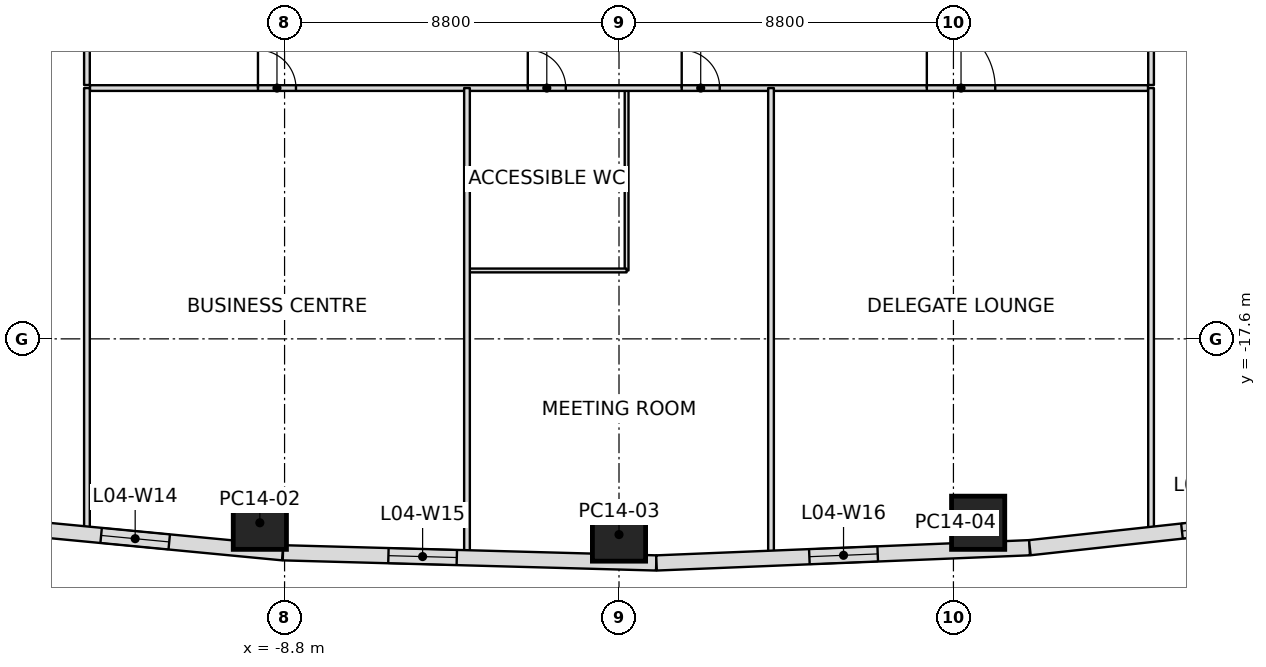
"""IFC4 building model, lengths in metres.
Left out: names, types, materials, properties, quantities, classifications, styles, units other than length and angle.
Written with IfcOpenShell. Run it as: python <this file> out.ifc"""

import sys

from ifc_helpers import new_model, si_unit, direction, frame, frame_2d, origin, origin_2d, place, context, subcontext, project, spatial, rectangle, extrude, element, fill, save


model = new_model("IFC4")
c1 = context("Model", 3, precision=1e-05, world=origin(), true_north=direction((0.0, 1.0)))
c2 = subcontext(c1, "Body", "Model", "MODEL_VIEW")
j1 = project(units=[si_unit("LENGTHUNIT", "METRE"), si_unit("PLANEANGLEUNIT", "RADIAN")], contexts=[c1])
p1 = place(None, origin())
s1 = spatial("IfcSite", under=j1, at=p1, CompositionType="ELEMENT")
p2 = place(p1, origin())
s2 = spatial("IfcBuilding", under=s1, at=p2, CompositionType="ELEMENT")
p3 = place(p2, frame((0.0, 0.0, 28.8)))
s3 = spatial("IfcBuildingStorey", under=s2, at=p3, CompositionType="ELEMENT", Elevation=28.8)
for number, where, z_axis, x_axis in (
    (1, (-9.45, -22.439, 0.0), (0.0, 0.0, 1.0), (-0.998, 0.066, 0.0)),
    (2, (0.0, -22.75, 0.0), (0.0, 0.0, 1.0), (1.0, 0.0, 0.0)),
    (3, (9.45, -22.439, 0.0), (0.0, 0.0, 1.0), (0.998, 0.066, 0.0)),
):
    element("IfcColumn", number, at=place(p3, frame(where, z_axis=z_axis, x_axis=x_axis)), inside=s3, PredefinedType="COLUMN", context=c2, shape_type="SweptSolid", body=[
        extrude(rectangle(XDim=1.4, YDim=1.4, at=origin_2d()), origin(), (0.0, 0.0, 1.0), 5.4),
    ])
p4 = place(p3, frame((-8.849, -23.229, 0.0), z_axis=(0.0, 0.0, 1.0), x_axis=(-0.995471095278, 0.095064706733, 0.0)))
e4 = element("IfcWall", 4, at=p4, inside=s3, PredefinedType="STANDARD", context=c2, shape_type="SweptSolid", body=[
    extrude(rectangle(XDim=9.826, YDim=0.4, at=frame_2d((4.913, 0.0))), origin(), (0.0, 0.0, 1.0), 4.5),
])
p5 = place(p4, frame((3.0, 0.0, 0.9)))
e5 = element("IfcOpeningElement", 5, at=p5, cuts=e4, PredefinedType="OPENING", context=c2, shape_type="SweptSolid", body=[
    extrude(rectangle(XDim=1.8, YDim=1.5, at=frame_2d((0.9, 0.75))), frame((0.0, 0.2, 0.0), z_axis=(0.0, -1.0, 0.0), x_axis=(1.0, 0.0, 0.0)), (0.0, 0.0, 1.0), 0.4),
])
p6 = place(p3, frame((0.98, -23.497, 0.0), z_axis=(0.0, 0.0, 1.0), x_axis=(-0.999629782494, 0.027208416899, 0.0)))
e6 = element("IfcWall", 6, at=p6, inside=s3, PredefinedType="STANDARD", context=c2, shape_type="SweptSolid", body=[
    extrude(rectangle(XDim=9.825, YDim=0.4, at=frame_2d((4.913, 0.0))), origin(), (0.0, 0.0, 1.0), 4.5),
])
p7 = place(p6, frame((5.25, 0.0, 0.9)))
e7 = element("IfcOpeningElement", 7, at=p7, cuts=e6, PredefinedType="OPENING", context=c2, shape_type="SweptSolid", body=[
    extrude(rectangle(XDim=1.8, YDim=1.5, at=frame_2d((0.9, 0.75))), frame((0.0, 0.2, 0.0), z_axis=(0.0, -1.0, 0.0), x_axis=(1.0, 0.0, 0.0)), (0.0, 0.0, 1.0), 0.4),
])
p8 = place(p3, frame((10.804, -23.096, 0.0), z_axis=(0.0, 0.0, 1.0), x_axis=(-0.999167350404, -0.04079958195, 0.0)))
e8 = element("IfcWall", 8, at=p8, inside=s3, PredefinedType="STANDARD", context=c2, shape_type="SweptSolid", body=[
    extrude(rectangle(XDim=9.826, YDim=0.4, at=frame_2d((4.913, 0.0))), origin(), (0.0, 0.0, 1.0), 4.5),
])
p9 = place(p8, frame((4.0, 0.0, 0.9)))
e9 = element("IfcOpeningElement", 9, at=p9, cuts=e8, PredefinedType="OPENING", context=c2, shape_type="SweptSolid", body=[
    extrude(rectangle(XDim=1.8, YDim=1.5, at=frame_2d((0.9, 0.75))), frame((0.0, 0.2, 0.0), z_axis=(0.0, -1.0, 0.0), x_axis=(1.0, 0.0, 0.0)), (0.0, 0.0, 1.0), 0.4),
])
p10 = place(p3, frame((20.579, -22.028, 0.0), z_axis=(0.0, 0.0, 1.0), x_axis=(-0.994084776508, -0.108606892574, 0.0)))
e10 = element("IfcWall", 10, at=p10, inside=s3, PredefinedType="STANDARD", context=c2, shape_type="SweptSolid", body=[
    extrude(rectangle(XDim=9.826, YDim=0.4, at=frame_2d((4.913, 0.0))), origin(), (0.0, 0.0, 1.0), 4.5),
])
p11 = place(p10, frame((4.0, 0.0, 0.9)))
e11 = element("IfcOpeningElement", 11, at=p11, cuts=e10, PredefinedType="OPENING", context=c2, shape_type="SweptSolid", body=[
    extrude(rectangle(XDim=1.8, YDim=1.5, at=frame_2d((0.9, 0.75))), frame((0.0, 0.2, 0.0), z_axis=(0.0, -1.0, 0.0), x_axis=(1.0, 0.0, 0.0)), (0.0, 0.0, 1.0), 0.4),
])
p12 = place(p3, frame((-14.0, -11.0, 0.0), z_axis=(0.0, 0.0, 1.0), x_axis=(0.0, -1.0, 0.0)))
e12 = element("IfcWall", 12, at=p12, inside=s3, PredefinedType="PARTITIONING", context=c2, shape_type="SweptSolid", body=[
    extrude(rectangle(XDim=11.697, YDim=0.15, at=frame_2d((5.849, 0.0))), origin(), (0.0, 0.0, 1.0), 4.384),
])
for number, where, z_axis, x_axis in (
    (13, (-4.0, -11.0, 0.0), (0.0, 0.0, 1.0), (0.0, -1.0, 0.0)),
    (14, (4.0, -11.0, 0.0), (0.0, 0.0, 1.0), (0.0, -1.0, 0.0)),
):
    element("IfcWall", number, at=place(p3, frame(where, z_axis=z_axis, x_axis=x_axis)), inside=s3, PredefinedType="PARTITIONING", context=c2, shape_type="SweptSolid", body=[
        extrude(rectangle(XDim=12.321, YDim=0.15, at=frame_2d((6.161, 0.0))), origin(), (0.0, 0.0, 1.0), 4.384),
    ])
p13 = place(p3, frame((14.0, -11.0, 0.0), z_axis=(0.0, 0.0, 1.0), x_axis=(0.0, -1.0, 0.0)))
e15 = element("IfcWall", 15, at=p13, inside=s3, PredefinedType="PARTITIONING", context=c2, shape_type="SweptSolid", body=[
    extrude(rectangle(XDim=11.697, YDim=0.15, at=frame_2d((5.849, 0.0))), origin(), (0.0, 0.0, 1.0), 4.384),
])
p14 = place(p3, frame((-14.0, 10.92, 0.0), z_axis=(0.0, 0.0, 1.0), x_axis=(0.0, -1.0, 0.0)))
e16 = element("IfcWall", 16, at=p14, inside=s3, PredefinedType="PARTITIONING", context=c2, shape_type="SweptSolid", body=[
    extrude(rectangle(XDim=21.84, YDim=0.15, at=frame_2d((10.92, 0.0))), origin(), (0.0, 0.0, 1.0), 4.097),
])
p15 = place(p14, frame((5.12, 0.0, 0.0)))
e17 = element("IfcOpeningElement", 17, at=p15, cuts=e16, PredefinedType="OPENING", context=c2, shape_type="SweptSolid", body=[
    extrude(rectangle(XDim=1.6, YDim=2.1, at=frame_2d((0.8, 1.05))), frame((0.0, 0.075, 0.0), z_axis=(0.0, -1.0, 0.0), x_axis=(1.0, 0.0, 0.0)), (0.0, 0.0, 1.0), 0.15),
])
p16 = place(p14, frame((16.43, 0.0, 0.0)))
e18 = element("IfcOpeningElement", 18, at=p16, cuts=e16, PredefinedType="OPENING", context=c2, shape_type="SweptSolid", body=[
    extrude(rectangle(XDim=1.0, YDim=2.1, at=frame_2d((0.5, 1.05))), frame((0.0, 0.075, 0.0), z_axis=(0.0, -1.0, 0.0), x_axis=(1.0, 0.0, 0.0)), (0.0, 0.0, 1.0), 0.15),
])
p17 = place(p3, frame((-13.92, -11.0, 0.0), z_axis=(0.0, 0.0, 1.0), x_axis=(1.0, 0.0, 0.0)))
e19 = element("IfcWall", 19, at=p17, inside=s3, PredefinedType="PARTITIONING", context=c2, shape_type="SweptSolid", body=[
    extrude(rectangle(XDim=27.84, YDim=0.15, at=frame_2d((13.92, 0.0))), origin(), (0.0, 0.0, 1.0), 4.397),
])
p18 = place(p17, frame((4.42, 0.0, 0.0)))
e20 = element("IfcOpeningElement", 20, at=p18, cuts=e19, PredefinedType="OPENING", context=c2, shape_type="SweptSolid", body=[
    extrude(rectangle(XDim=1.0, YDim=2.1, at=frame_2d((0.5, 1.05))), frame((0.0, 0.075, 0.0), z_axis=(0.0, -1.0, 0.0), x_axis=(1.0, 0.0, 0.0)), (0.0, 0.0, 1.0), 0.15),
])
p19 = place(p17, frame((11.52, 0.0, 0.0)))
e21 = element("IfcOpeningElement", 21, at=p19, cuts=e19, PredefinedType="OPENING", context=c2, shape_type="SweptSolid", body=[
    extrude(rectangle(XDim=1.0, YDim=2.1, at=frame_2d((0.5, 1.05))), frame((0.0, 0.075, 0.0), z_axis=(0.0, -1.0, 0.0), x_axis=(1.0, 0.0, 0.0)), (0.0, 0.0, 1.0), 0.15),
])
p20 = place(p17, frame((15.57, 0.0, 0.0)))
e22 = element("IfcOpeningElement", 22, at=p20, cuts=e19, PredefinedType="OPENING", context=c2, shape_type="SweptSolid", body=[
    extrude(rectangle(XDim=1.0, YDim=2.1, at=frame_2d((0.5, 1.05))), frame((0.0, 0.075, 0.0), z_axis=(0.0, -1.0, 0.0), x_axis=(1.0, 0.0, 0.0)), (0.0, 0.0, 1.0), 0.15),
])
p21 = place(p17, frame((22.02, 0.0, 0.0)))
e23 = element("IfcOpeningElement", 23, at=p21, cuts=e19, PredefinedType="OPENING", context=c2, shape_type="SweptSolid", body=[
    extrude(rectangle(XDim=1.8, YDim=2.1, at=frame_2d((0.9, 1.05))), frame((0.0, 0.075, 0.0), z_axis=(0.0, -1.0, 0.0), x_axis=(1.0, 0.0, 0.0)), (0.0, 0.0, 1.0), 0.15),
])
p22 = place(p3, frame((14.0, -10.92, 0.0), z_axis=(0.0, 0.0, 1.0), x_axis=(0.0, 1.0, 0.0)))
e24 = element("IfcWall", 24, at=p22, inside=s3, PredefinedType="PARTITIONING", context=c2, shape_type="SweptSolid", body=[
    extrude(rectangle(XDim=21.84, YDim=0.15, at=frame_2d((10.92, 0.0))), origin(), (0.0, 0.0, 1.0), 4.097),
])
p23 = place(p22, frame((13.52, 0.0, 0.0)))
e25 = element("IfcOpeningElement", 25, at=p23, cuts=e24, PredefinedType="OPENING", context=c2, shape_type="SweptSolid", body=[
    extrude(rectangle(XDim=1.0, YDim=2.1, at=frame_2d((0.5, 1.05))), frame((0.0, 0.075, 0.0), z_axis=(0.0, -1.0, 0.0), x_axis=(1.0, 0.0, 0.0)), (0.0, 0.0, 1.0), 0.15),
])
p24 = place(p22, frame((18.57, 0.0, 0.0)))
e26 = element("IfcOpeningElement", 26, at=p24, cuts=e24, PredefinedType="OPENING", context=c2, shape_type="SweptSolid", body=[
    extrude(rectangle(XDim=1.0, YDim=2.1, at=frame_2d((0.5, 1.05))), frame((0.0, 0.075, 0.0), z_axis=(0.0, -1.0, 0.0), x_axis=(1.0, 0.0, 0.0)), (0.0, 0.0, 1.0), 0.15),
])
p25 = place(p22, frame((1.41, 0.0, 0.0)))
e27 = element("IfcOpeningElement", 27, at=p25, cuts=e24, PredefinedType="OPENING", context=c2, shape_type="SweptSolid", body=[
    extrude(rectangle(XDim=1.0, YDim=2.1, at=frame_2d((0.5, 1.05))), frame((0.0, 0.075, 0.0), z_axis=(0.0, -1.0, 0.0), x_axis=(1.0, 0.0, 0.0)), (0.0, 0.0, 1.0), 0.15),
])
p26 = place(p22, frame((7.12, 0.0, 0.0)))
e28 = element("IfcOpeningElement", 28, at=p26, cuts=e24, PredefinedType="OPENING", context=c2, shape_type="SweptSolid", body=[
    extrude(rectangle(XDim=1.6, YDim=2.1, at=frame_2d((0.8, 1.05))), frame((0.0, 0.075, 0.0), z_axis=(0.0, -1.0, 0.0), x_axis=(1.0, 0.0, 0.0)), (0.0, 0.0, 1.0), 0.15),
])
p27 = place(p3, frame((0.2, -11.03, 0.0), z_axis=(0.0, 0.0, 1.0), x_axis=(0.0, -1.0, 0.0)))
e29 = element("IfcWall", 29, at=p27, inside=s3, PredefinedType="PARTITIONING", context=c2, shape_type="SweptSolid", body=[
    extrude(rectangle(XDim=4.77, YDim=0.1, at=frame_2d((2.385, 0.0))), origin(), (0.0, 0.0, 1.0), 4.6),
])
p28 = place(p3, frame((0.2, -15.8, 0.0), z_axis=(0.0, 0.0, 1.0), x_axis=(-1.0, 0.0, 0.0)))
e30 = element("IfcWall", 30, at=p28, inside=s3, PredefinedType="PARTITIONING", context=c2, shape_type="SweptSolid", body=[
    extrude(rectangle(XDim=4.17, YDim=0.1, at=frame_2d((2.085, 0.0))), origin(), (0.0, 0.0, 1.0), 4.397),
])
p29 = place(p5, origin())
e31 = element("IfcWindow", 31, at=p29, inside=s3, PartitioningType="SINGLE_PANEL", PredefinedType="WINDOW", context=c2, shape_type="SweptSolid", body=[
    extrude(rectangle(XDim=1.8, YDim=1.5, at=frame_2d((0.9, 0.75))), frame((0.0, 0.03, 0.0), z_axis=(0.0, -1.0, 0.0), x_axis=(1.0, 0.0, 0.0)), (0.0, 0.0, 1.0), 0.06),
])
fill(e5, e31)
p30 = place(p7, origin())
e32 = element("IfcWindow", 32, at=p30, inside=s3, PartitioningType="SINGLE_PANEL", PredefinedType="WINDOW", context=c2, shape_type="SweptSolid", body=[
    extrude(rectangle(XDim=1.8, YDim=1.5, at=frame_2d((0.9, 0.75))), frame((0.0, 0.03, 0.0), z_axis=(0.0, -1.0, 0.0), x_axis=(1.0, 0.0, 0.0)), (0.0, 0.0, 1.0), 0.06),
])
fill(e7, e32)
p31 = place(p9, origin())
e33 = element("IfcWindow", 33, at=p31, inside=s3, PartitioningType="SINGLE_PANEL", PredefinedType="WINDOW", context=c2, shape_type="SweptSolid", body=[
    extrude(rectangle(XDim=1.8, YDim=1.5, at=frame_2d((0.9, 0.75))), frame((0.0, 0.03, 0.0), z_axis=(0.0, -1.0, 0.0), x_axis=(1.0, 0.0, 0.0)), (0.0, 0.0, 1.0), 0.06),
])
fill(e9, e33)
p32 = place(p11, origin())
e34 = element("IfcWindow", 34, at=p32, inside=s3, PartitioningType="SINGLE_PANEL", PredefinedType="WINDOW", context=c2, shape_type="SweptSolid", body=[
    extrude(rectangle(XDim=1.8, YDim=1.5, at=frame_2d((0.9, 0.75))), frame((0.0, 0.03, 0.0), z_axis=(0.0, -1.0, 0.0), x_axis=(1.0, 0.0, 0.0)), (0.0, 0.0, 1.0), 0.06),
])
fill(e11, e34)
p33 = place(p18, origin())
e35 = element("IfcDoor", 35, at=p33, inside=s3, OperationType="SINGLE_SWING_RIGHT", PredefinedType="DOOR", context=c2, shape_type="SweptSolid", body=[
    extrude(rectangle(XDim=1.0, YDim=2.1, at=frame_2d((0.5, 1.05))), frame((0.0, 0.025, 0.0), z_axis=(0.0, -1.0, 0.0), x_axis=(1.0, 0.0, 0.0)), (0.0, 0.0, 1.0), 0.05),
])
fill(e20, e35)
p34 = place(p19, origin())
e36 = element("IfcDoor", 36, at=p34, inside=s3, OperationType="SINGLE_SWING_RIGHT", PredefinedType="DOOR", context=c2, shape_type="SweptSolid", body=[
    extrude(rectangle(XDim=1.0, YDim=2.1, at=frame_2d((0.5, 1.05))), frame((0.0, 0.025, 0.0), z_axis=(0.0, -1.0, 0.0), x_axis=(1.0, 0.0, 0.0)), (0.0, 0.0, 1.0), 0.05),
])
fill(e21, e36)
p35 = place(p20, origin())
e37 = element("IfcDoor", 37, at=p35, inside=s3, OperationType="SINGLE_SWING_LEFT", PredefinedType="DOOR", context=c2, shape_type="SweptSolid", body=[
    extrude(rectangle(XDim=1.0, YDim=2.1, at=frame_2d((0.5, 1.05))), frame((0.0, 0.025, 0.0), z_axis=(0.0, -1.0, 0.0), x_axis=(1.0, 0.0, 0.0)), (0.0, 0.0, 1.0), 0.05),
])
fill(e22, e37)
p36 = place(p21, origin())
e38 = element("IfcDoor", 38, at=p36, inside=s3, OperationType="DOUBLE_DOOR_SINGLE_SWING", PredefinedType="DOOR", context=c2, shape_type="SweptSolid", body=[
    extrude(rectangle(XDim=1.8, YDim=2.1, at=frame_2d((0.9, 1.05))), frame((0.0, 0.025, 0.0), z_axis=(0.0, -1.0, 0.0), x_axis=(1.0, 0.0, 0.0)), (0.0, 0.0, 1.0), 0.05),
])
fill(e23, e38)
save(model, sys.argv[1])
